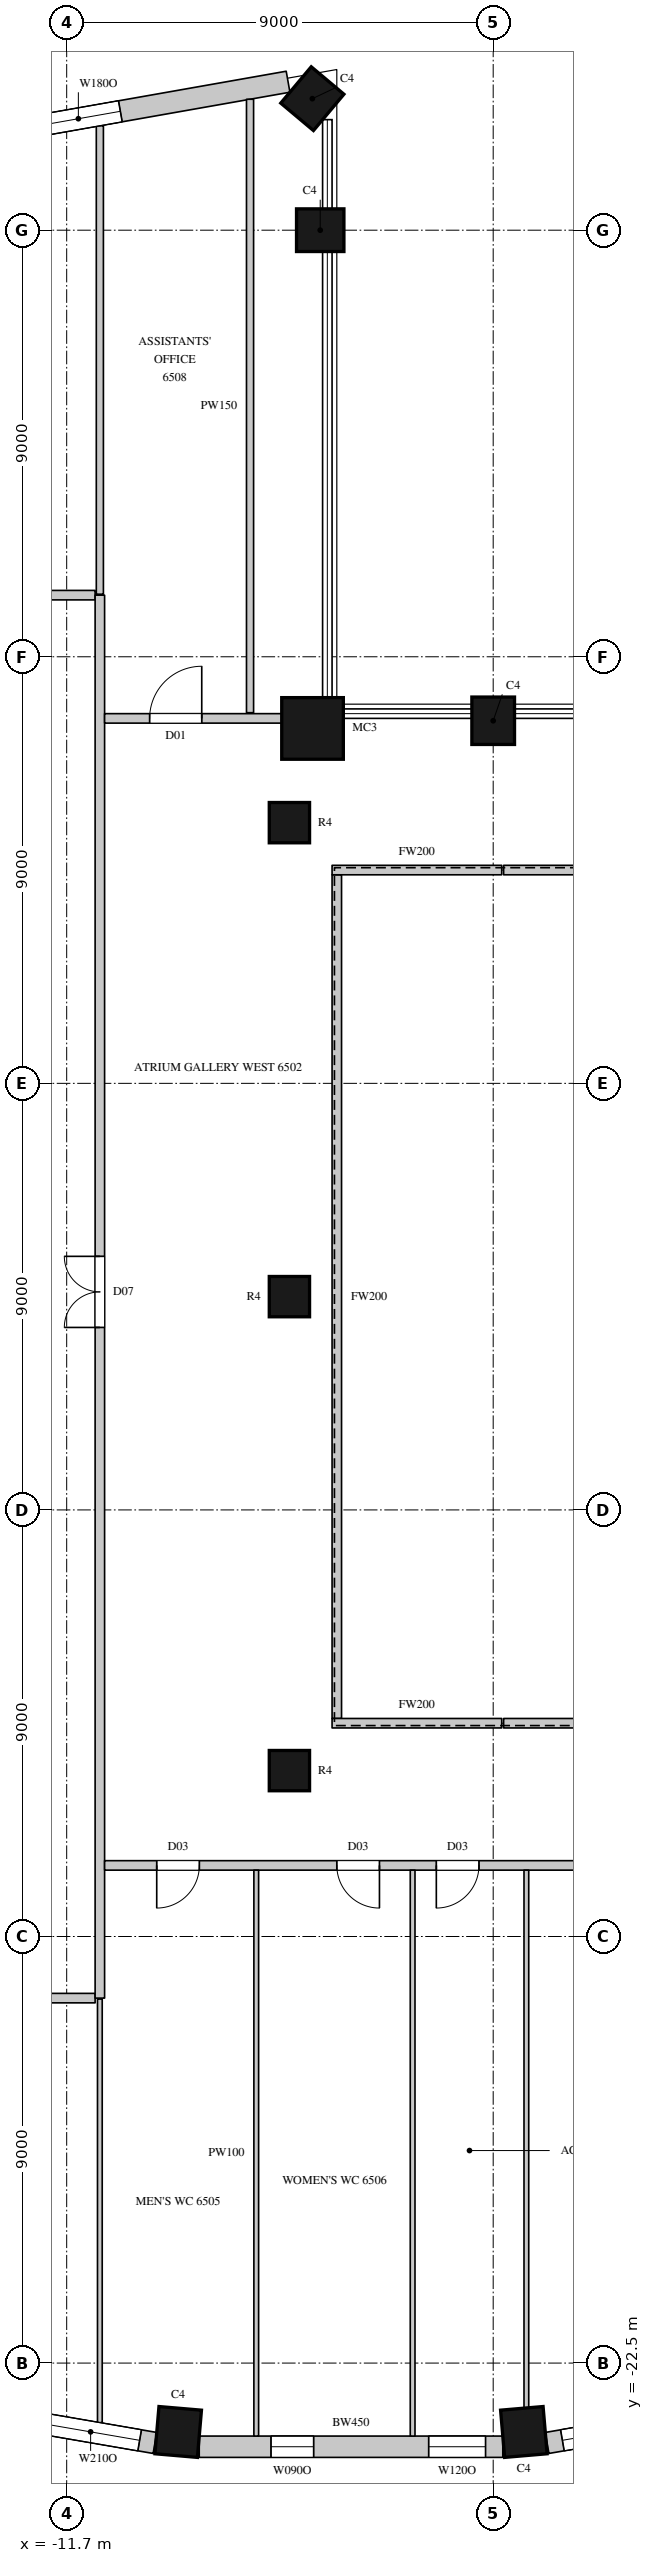
"""IFC4 building model, lengths in metres.
Left out: names, types, materials, properties, quantities, classifications, styles, units other than length and angle.
Written with IfcOpenShell. Run it as: python <this file> out.ifc"""

import sys

from ifc_helpers import new_model, si_unit, direction, frame, frame_2d, origin, origin_2d, place, context, subcontext, project, spatial, rectangle, circle, extrude, element, fill, save


model = new_model("IFC4")
c1 = context("Model", 3, precision=1e-05, world=origin(), true_north=direction((0.0, 1.0)))
c2 = subcontext(c1, "Body", "Model", "MODEL_VIEW")
j1 = project(units=[si_unit("LENGTHUNIT", "METRE"), si_unit("PLANEANGLEUNIT", "RADIAN")], contexts=[c1])
p1 = place(None, origin())
s1 = spatial("IfcSite", under=j1, at=p1, CompositionType="ELEMENT")
p2 = place(p1, origin())
s2 = spatial("IfcBuilding", under=s1, at=p2, CompositionType="ELEMENT")
p3 = place(p2, frame((0.0, 0.0, 288.5)))
s3 = spatial("IfcBuildingStorey", under=s2, at=p3, CompositionType="ELEMENT", Elevation=288.5)
p4 = place(p3, frame((-2.7, 12.15, 0.0), z_axis=(0.0, 0.0, 1.0), x_axis=(-1.0, 0.0, 0.0)))
e1 = element("IfcColumn", 1, at=p4, inside=s3, PredefinedType="COLUMN", context=c2, shape_type="SweptSolid", body=[
    extrude(rectangle(XDim=0.9, YDim=1.0, at=origin_2d()), origin(), (0.0, 0.0, 1.0), 4.1),
])
p5 = place(p3, frame((-6.512, 11.988, 0.0), z_axis=(0.0, 0.0, 1.0), x_axis=(1.0, 0.0, 0.0)))
e2 = element("IfcColumn", 2, at=p5, inside=s3, PredefinedType="COLUMN", context=c2, shape_type="SweptSolid", body=[
    extrude(circle(Radius=0.65, at=origin_2d()), origin(), (0.0, 0.0, 1.0), 4.1),
])
for number, where, z_axis, x_axis in (
    (3, (-6.35, 22.5, 0.0), (0.0, 0.0, 1.0), (0.0, 1.0, 0.0)),
    (4, (-6.516, 25.275, 0.0), (0.0, 0.0, 1.0), (-0.766, 0.643, 0.0)),
    (5, (-9.347, -23.954, 0.0), (0.0, 0.0, 1.0), (0.996, -0.085, 0.0)),
    (6, (-2.053, -23.954, 0.0), (0.0, 0.0, 1.0), (0.996, 0.085, 0.0)),
):
    element("IfcColumn", number, at=place(p3, frame(where, z_axis=z_axis, x_axis=x_axis)), inside=s3, PredefinedType="COLUMN", context=c2, shape_type="SweptSolid", body=[
        extrude(rectangle(XDim=0.9, YDim=1.0, at=origin_2d()), origin(), (0.0, 0.0, 1.0), 4.1),
    ])
for number, where, z_axis, x_axis in (
    (7, (-7.0, -10.0, 0.0), (0.0, 0.0, 1.0), (1.0, 0.0, 0.0)),
    (8, (-7.0, 0.0, 0.0), (0.0, 0.0, 1.0), (1.0, 0.0, 0.0)),
    (9, (-7.0, 10.0, 0.0), (0.0, 0.0, 1.0), (1.0, 0.0, 0.0)),
):
    element("IfcColumn", number, at=place(p3, frame(where, z_axis=z_axis, x_axis=x_axis)), inside=s3, PredefinedType="COLUMN", context=c2, shape_type="SweptSolid", body=[
        extrude(circle(Radius=0.425, at=origin_2d()), origin(), (0.0, 0.0, 1.0), 4.1),
    ])
p6 = place(p3, frame((-7.029, 25.632, 0.0), z_axis=(0.0, 0.0, 1.0), x_axis=(-0.984797606634, -0.173705710808, 0.0)))
e10 = element("IfcWall", 10, at=p6, inside=s3, PredefinedType="SOLIDWALL", context=c2, shape_type="SweptSolid", body=[
    extrude(rectangle(XDim=5.772, YDim=0.45, at=frame_2d((2.886, 0.0))), origin(), (0.0, 0.0, 1.0), 3.8),
])
p7 = place(p6, frame((3.593, 0.0, 1.05)))
e11 = element("IfcOpeningElement", 11, at=p7, cuts=e10, PredefinedType="OPENING", context=c2, shape_type="SweptSolid", body=[
    extrude(rectangle(XDim=1.8, YDim=2.4, at=frame_2d((0.9, 1.2))), frame((0.0, 0.235, 0.0), z_axis=(0.0, -1.0, 0.0), x_axis=(1.0, 0.0, 0.0)), (0.0, 0.0, 1.0), 0.47),
])
p8 = place(p3, frame((-16.157, -23.097, 0.0), z_axis=(0.0, 0.0, 1.0), x_axis=(0.985502073964, -0.169663379113, 0.0)))
e12 = element("IfcWall", 12, at=p8, inside=s3, PredefinedType="SOLIDWALL", context=c2, shape_type="SweptSolid", body=[
    extrude(rectangle(XDim=6.412, YDim=0.45, at=frame_2d((3.206, 0.0))), origin(), (0.0, 0.0, 1.0), 3.8),
])
p9 = place(p8, frame((0.327, 0.0, 1.05)))
e13 = element("IfcOpeningElement", 13, at=p9, cuts=e12, PredefinedType="OPENING", context=c2, shape_type="SweptSolid", body=[
    extrude(rectangle(XDim=2.1, YDim=2.4, at=frame_2d((1.05, 1.2))), frame((0.0, 0.235, 0.0), z_axis=(0.0, -1.0, 0.0), x_axis=(1.0, 0.0, 0.0)), (0.0, 0.0, 1.0), 0.47),
])
p10 = place(p8, frame((3.985, 0.0, 1.05)))
e14 = element("IfcOpeningElement", 14, at=p10, cuts=e12, PredefinedType="OPENING", context=c2, shape_type="SweptSolid", body=[
    extrude(rectangle(XDim=2.1, YDim=2.4, at=frame_2d((1.05, 1.2))), frame((0.0, 0.235, 0.0), z_axis=(0.0, -1.0, 0.0), x_axis=(1.0, 0.0, 0.0)), (0.0, 0.0, 1.0), 0.47),
])
p11 = place(p3, frame((-8.903, -24.265, 0.0), z_axis=(0.0, 0.0, 1.0), x_axis=(1.0, 0.0, 0.0)))
e15 = element("IfcWall", 15, at=p11, inside=s3, PredefinedType="SOLIDWALL", context=c2, shape_type="SweptSolid", body=[
    extrude(rectangle(XDim=6.406, YDim=0.45, at=frame_2d((3.203, 0.0))), origin(), (0.0, 0.0, 1.0), 3.8),
])
p12 = place(p11, frame((1.514, 0.0, 1.05)))
e16 = element("IfcOpeningElement", 16, at=p12, cuts=e15, PredefinedType="OPENING", context=c2, shape_type="SweptSolid", body=[
    extrude(rectangle(XDim=0.9, YDim=2.4, at=frame_2d((0.45, 1.2))), frame((0.0, 0.235, 0.0), z_axis=(0.0, -1.0, 0.0), x_axis=(1.0, 0.0, 0.0)), (0.0, 0.0, 1.0), 0.47),
])
p13 = place(p11, frame((4.841, 0.0, 1.05)))
e17 = element("IfcOpeningElement", 17, at=p13, cuts=e15, PredefinedType="OPENING", context=c2, shape_type="SweptSolid", body=[
    extrude(rectangle(XDim=1.2, YDim=2.4, at=frame_2d((0.6, 1.2))), frame((0.0, 0.235, 0.0), z_axis=(0.0, -1.0, 0.0), x_axis=(1.0, 0.0, 0.0)), (0.0, 0.0, 1.0), 0.47),
])
p14 = place(p3, frame((-1.562, -24.185, 0.0), z_axis=(0.0, 0.0, 1.0), x_axis=(0.985502073964, 0.169663379113, 0.0)))
e18 = element("IfcWall", 18, at=p14, inside=s3, PredefinedType="SOLIDWALL", context=c2, shape_type="SweptSolid", body=[
    extrude(rectangle(XDim=6.412, YDim=0.45, at=frame_2d((3.206, 0.0))), origin(), (0.0, 0.0, 1.0), 3.8),
])
p15 = place(p14, frame((0.327, 0.0, 1.05)))
e19 = element("IfcOpeningElement", 19, at=p15, cuts=e18, PredefinedType="OPENING", context=c2, shape_type="SweptSolid", body=[
    extrude(rectangle(XDim=2.1, YDim=2.4, at=frame_2d((1.05, 1.2))), frame((0.0, 0.235, 0.0), z_axis=(0.0, -1.0, 0.0), x_axis=(1.0, 0.0, 0.0)), (0.0, 0.0, 1.0), 0.47),
])
p16 = place(p14, frame((3.985, 0.0, 1.05)))
e20 = element("IfcOpeningElement", 20, at=p16, cuts=e18, PredefinedType="OPENING", context=c2, shape_type="SweptSolid", body=[
    extrude(rectangle(XDim=2.1, YDim=2.4, at=frame_2d((1.05, 1.2))), frame((0.0, 0.235, 0.0), z_axis=(0.0, -1.0, 0.0), x_axis=(1.0, 0.0, 0.0)), (0.0, 0.0, 1.0), 0.47),
])
for number, where, z_axis, x_axis in (
    (21, (-13.97, -14.8, 0.0), (0.0, 0.0, 1.0), (1.0, 0.0, 0.0)),
    (22, (-13.97, 14.8, 0.0), (0.0, 0.0, 1.0), (1.0, 0.0, 0.0)),
):
    element("IfcWall", number, at=place(p3, frame(where, z_axis=z_axis, x_axis=x_axis)), inside=s3, PredefinedType="PARTITIONING", context=c2, shape_type="SweptSolid", body=[
        extrude(rectangle(XDim=2.87, YDim=0.2, at=frame_2d((1.435, 0.0))), origin(), (0.0, 0.0, 1.0), 3.8),
    ])
p17 = place(p3, frame((-11.0, -14.8, 0.0), z_axis=(0.0, 0.0, 1.0), x_axis=(0.0, 1.0, 0.0)))
e23 = element("IfcWall", 23, at=p17, inside=s3, PredefinedType="PARTITIONING", context=c2, shape_type="SweptSolid", body=[
    extrude(rectangle(XDim=29.6, YDim=0.2, at=frame_2d((14.8, 0.0))), origin(), (0.0, 0.0, 1.0), 3.8),
])
p18 = place(p17, frame((14.15, 0.0, 0.0)))
e24 = element("IfcOpeningElement", 24, at=p18, cuts=e23, PredefinedType="OPENING", context=c2, shape_type="SweptSolid", body=[
    extrude(rectangle(XDim=1.5, YDim=2.4, at=frame_2d((0.75, 1.2))), frame((0.0, 0.11, 0.0), z_axis=(0.0, -1.0, 0.0), x_axis=(1.0, 0.0, 0.0)), (0.0, 0.0, 1.0), 0.22),
])
p19 = place(p3, frame((-10.9, -12.0, 0.0), z_axis=(0.0, 0.0, 1.0), x_axis=(1.0, 0.0, 0.0)))
e25 = element("IfcWall", 25, at=p19, inside=s3, PredefinedType="PARTITIONING", context=c2, shape_type="SweptSolid", body=[
    extrude(rectangle(XDim=21.8, YDim=0.2, at=frame_2d((10.9, 0.0))), origin(), (0.0, 0.0, 1.0), 3.8),
])
p20 = place(p19, frame((1.1, 0.0, 0.0)))
e26 = element("IfcOpeningElement", 26, at=p20, cuts=e25, PredefinedType="OPENING", context=c2, shape_type="SweptSolid", body=[
    extrude(rectangle(XDim=0.9, YDim=2.2, at=frame_2d((0.45, 1.1))), frame((0.0, 0.11, 0.0), z_axis=(0.0, -1.0, 0.0), x_axis=(1.0, 0.0, 0.0)), (0.0, 0.0, 1.0), 0.22),
])
p21 = place(p19, frame((4.9, 0.0, 0.0)))
e27 = element("IfcOpeningElement", 27, at=p21, cuts=e25, PredefinedType="OPENING", context=c2, shape_type="SweptSolid", body=[
    extrude(rectangle(XDim=0.9, YDim=2.2, at=frame_2d((0.45, 1.1))), frame((0.0, 0.11, 0.0), z_axis=(0.0, -1.0, 0.0), x_axis=(1.0, 0.0, 0.0)), (0.0, 0.0, 1.0), 0.22),
])
p22 = place(p19, frame((7.0, 0.0, 0.0)))
e28 = element("IfcOpeningElement", 28, at=p22, cuts=e25, PredefinedType="OPENING", context=c2, shape_type="SweptSolid", body=[
    extrude(rectangle(XDim=0.9, YDim=2.2, at=frame_2d((0.45, 1.1))), frame((0.0, 0.11, 0.0), z_axis=(0.0, -1.0, 0.0), x_axis=(1.0, 0.0, 0.0)), (0.0, 0.0, 1.0), 0.22),
])
p23 = place(p19, frame((9.95, 0.0, 0.0)))
e29 = element("IfcOpeningElement", 29, at=p23, cuts=e25, PredefinedType="OPENING", context=c2, shape_type="SweptSolid", body=[
    extrude(rectangle(XDim=1.1, YDim=2.4, at=frame_2d((0.55, 1.2))), frame((0.0, 0.11, 0.0), z_axis=(0.0, -1.0, 0.0), x_axis=(1.0, 0.0, 0.0)), (0.0, 0.0, 1.0), 0.22),
])
p24 = place(p3, frame((-10.9, 12.2, 0.0), z_axis=(0.0, 0.0, 1.0), x_axis=(1.0, 0.0, 0.0)))
e30 = element("IfcWall", 30, at=p24, inside=s3, PredefinedType="PARTITIONING", context=c2, shape_type="SweptSolid", body=[
    extrude(rectangle(XDim=3.756, YDim=0.2, at=frame_2d((1.878, 0.0))), origin(), (0.0, 0.0, 1.0), 3.8),
])
p25 = place(p24, frame((0.95, 0.0, 0.0)))
e31 = element("IfcOpeningElement", 31, at=p25, cuts=e30, PredefinedType="OPENING", context=c2, shape_type="SweptSolid", body=[
    extrude(rectangle(XDim=1.1, YDim=2.4, at=frame_2d((0.55, 1.2))), frame((0.0, 0.11, 0.0), z_axis=(0.0, -1.0, 0.0), x_axis=(1.0, 0.0, 0.0)), (0.0, 0.0, 1.0), 0.22),
])
p26 = place(p3, frame((-6.0, -8.9, 0.0), z_axis=(0.0, 0.0, 1.0), x_axis=(0.0, 1.0, 0.0)))
e32 = element("IfcWall", 32, at=p26, inside=s3, PredefinedType="PARTITIONING", context=c2, shape_type="SweptSolid", body=[
    extrude(rectangle(XDim=17.8, YDim=0.2, at=frame_2d((8.9, 0.0))), origin(), (0.0, 0.0, 1.0), 3.8),
])
for number, where, z_axis, x_axis in (
    (33, (-6.1, -9.0, 0.0), (0.0, 0.0, 1.0), (1.0, 0.0, 0.0)),
    (34, (-6.1, 9.0, 0.0), (0.0, 0.0, 1.0), (1.0, 0.0, 0.0)),
):
    element("IfcWall", number, at=place(p3, frame(where, z_axis=z_axis, x_axis=x_axis)), inside=s3, PredefinedType="PARTITIONING", context=c2, shape_type="SweptSolid", body=[
        extrude(rectangle(XDim=3.58, YDim=0.2, at=frame_2d((1.79, 0.0))), origin(), (0.0, 0.0, 1.0), 3.8),
    ])
for number, where, z_axis, x_axis in (
    (35, (-2.48, -9.0, 0.0), (0.0, 0.0, 1.0), (1.0, 0.0, 0.0)),
    (36, (-2.48, 9.0, 0.0), (0.0, 0.0, 1.0), (1.0, 0.0, 0.0)),
):
    element("IfcWall", number, at=place(p3, frame(where, z_axis=z_axis, x_axis=x_axis)), inside=s3, PredefinedType="PARTITIONING", context=c2, shape_type="SweptSolid", body=[
        extrude(rectangle(XDim=10.58, YDim=0.2, at=frame_2d((5.29, 0.0))), origin(), (0.0, 0.0, 1.0), 3.8),
    ])
p27 = place(p3, frame((-11.0, 14.82, 0.0), z_axis=(0.0, 0.0, 1.0), x_axis=(0.0, 1.0, 0.0)))
e37 = element("IfcWall", 37, at=p27, inside=s3, PredefinedType="PARTITIONING", context=c2, shape_type="SweptSolid", body=[
    extrude(rectangle(XDim=9.883, YDim=0.15, at=frame_2d((4.942, 0.0))), origin(), (0.0, 0.0, 1.0), 3.8),
])
p28 = place(p3, frame((-7.831, 12.32, 0.0), z_axis=(0.0, 0.0, 1.0), x_axis=(0.0, 1.0, 0.0)))
e38 = element("IfcWall", 38, at=p28, inside=s3, PredefinedType="PARTITIONING", context=c2, shape_type="SweptSolid", body=[
    extrude(rectangle(XDim=12.942, YDim=0.15, at=frame_2d((6.471, 0.0))), origin(), (0.0, 0.0, 1.0), 3.8),
])
p29 = place(p3, frame((-11.0, -23.757, 0.0), z_axis=(0.0, 0.0, 1.0), x_axis=(0.0, 1.0, 0.0)))
e39 = element("IfcWall", 39, at=p29, inside=s3, PredefinedType="PARTITIONING", context=c2, shape_type="SweptSolid", body=[
    extrude(rectangle(XDim=8.937, YDim=0.1, at=frame_2d((4.468, 0.0))), origin(), (0.0, 0.0, 1.0), 3.8),
])
for number, where, z_axis, x_axis in (
    (40, (-7.7, -24.04, 0.0), (0.0, 0.0, 1.0), (0.0, 1.0, 0.0)),
    (41, (-4.4, -24.04, 0.0), (0.0, 0.0, 1.0), (0.0, 1.0, 0.0)),
):
    element("IfcWall", number, at=place(p3, frame(where, z_axis=z_axis, x_axis=x_axis)), inside=s3, PredefinedType="PARTITIONING", context=c2, shape_type="SweptSolid", body=[
        extrude(rectangle(XDim=11.94, YDim=0.1, at=frame_2d((5.97, 0.0))), origin(), (0.0, 0.0, 1.0), 3.8),
    ])
p30 = place(p3, frame((-2.0, -23.447, 0.0), z_axis=(0.0, 0.0, 1.0), x_axis=(0.0, 1.0, 0.0)))
e42 = element("IfcWall", 42, at=p30, inside=s3, PredefinedType="PARTITIONING", context=c2, shape_type="SweptSolid", body=[
    extrude(rectangle(XDim=11.347, YDim=0.1, at=frame_2d((5.674, 0.0))), origin(), (0.0, 0.0, 1.0), 3.8),
])
p31 = place(p7, origin())
e43 = element("IfcWindow", 43, at=p31, inside=s3, PartitioningType="SINGLE_PANEL", PredefinedType="WINDOW", context=c2, shape_type="SweptSolid", body=[
    extrude(rectangle(XDim=1.8, YDim=2.4, at=frame_2d((0.9, 1.2))), frame((0.0, 0.135, 0.0), z_axis=(0.0, -1.0, 0.0), x_axis=(1.0, 0.0, 0.0)), (0.0, 0.0, 1.0), 0.06),
])
fill(e11, e43)
p32 = place(p10, origin())
e44 = element("IfcWindow", 44, at=p32, inside=s3, PartitioningType="SINGLE_PANEL", PredefinedType="WINDOW", context=c2, shape_type="SweptSolid", body=[
    extrude(rectangle(XDim=2.1, YDim=2.4, at=frame_2d((1.05, 1.2))), frame((0.0, 0.135, 0.0), z_axis=(0.0, -1.0, 0.0), x_axis=(1.0, 0.0, 0.0)), (0.0, 0.0, 1.0), 0.06),
])
fill(e14, e44)
p33 = place(p15, origin())
e45 = element("IfcWindow", 45, at=p33, inside=s3, PartitioningType="SINGLE_PANEL", PredefinedType="WINDOW", context=c2, shape_type="SweptSolid", body=[
    extrude(rectangle(XDim=2.1, YDim=2.4, at=frame_2d((1.05, 1.2))), frame((0.0, 0.135, 0.0), z_axis=(0.0, -1.0, 0.0), x_axis=(1.0, 0.0, 0.0)), (0.0, 0.0, 1.0), 0.06),
])
fill(e19, e45)
p34 = place(p18, origin())
e46 = element("IfcDoor", 46, at=p34, inside=s3, OperationType="DOUBLE_DOOR_SINGLE_SWING", PredefinedType="DOOR", context=c2, shape_type="SweptSolid", body=[
    extrude(rectangle(XDim=1.5, YDim=2.4, at=frame_2d((0.75, 1.2))), frame((0.0, 0.025, 0.0), z_axis=(0.0, -1.0, 0.0), x_axis=(1.0, 0.0, 0.0)), (0.0, 0.0, 1.0), 0.05),
])
fill(e24, e46)
p35 = place(p20, origin())
e47 = element("IfcDoor", 47, at=p35, inside=s3, OperationType="SINGLE_SWING_RIGHT", PredefinedType="DOOR", context=c2, shape_type="SweptSolid", body=[
    extrude(rectangle(XDim=0.9, YDim=2.2, at=frame_2d((0.45, 1.1))), frame((0.0, 0.025, 0.0), z_axis=(0.0, -1.0, 0.0), x_axis=(1.0, 0.0, 0.0)), (0.0, 0.0, 1.0), 0.05),
])
fill(e26, e47)
p36 = place(p21, origin())
e48 = element("IfcDoor", 48, at=p36, inside=s3, OperationType="SINGLE_SWING_LEFT", PredefinedType="DOOR", context=c2, shape_type="SweptSolid", body=[
    extrude(rectangle(XDim=0.9, YDim=2.2, at=frame_2d((0.45, 1.1))), frame((0.0, 0.025, 0.0), z_axis=(0.0, -1.0, 0.0), x_axis=(1.0, 0.0, 0.0)), (0.0, 0.0, 1.0), 0.05),
])
fill(e27, e48)
p37 = place(p22, origin())
e49 = element("IfcDoor", 49, at=p37, inside=s3, OperationType="SINGLE_SWING_RIGHT", PredefinedType="DOOR", context=c2, shape_type="SweptSolid", body=[
    extrude(rectangle(XDim=0.9, YDim=2.2, at=frame_2d((0.45, 1.1))), frame((0.0, 0.025, 0.0), z_axis=(0.0, -1.0, 0.0), x_axis=(1.0, 0.0, 0.0)), (0.0, 0.0, 1.0), 0.05),
])
fill(e28, e49)
p38 = place(p25, origin())
e50 = element("IfcDoor", 50, at=p38, inside=s3, OperationType="SINGLE_SWING_RIGHT", PredefinedType="DOOR", context=c2, shape_type="SweptSolid", body=[
    extrude(rectangle(XDim=1.1, YDim=2.4, at=frame_2d((0.55, 1.2))), frame((0.0, 0.025, 0.0), z_axis=(0.0, -1.0, 0.0), x_axis=(1.0, 0.0, 0.0)), (0.0, 0.0, 1.0), 0.05),
])
fill(e31, e50)
p39 = place(p12, origin())
e51 = element("IfcWindow", 51, at=p39, inside=s3, PartitioningType="SINGLE_PANEL", PredefinedType="WINDOW", context=c2, shape_type="SweptSolid", body=[
    extrude(rectangle(XDim=0.9, YDim=2.4, at=frame_2d((0.45, 1.2))), frame((0.0, 0.135, 0.0), z_axis=(0.0, -1.0, 0.0), x_axis=(1.0, 0.0, 0.0)), (0.0, 0.0, 1.0), 0.06),
])
fill(e16, e51)
p40 = place(p13, origin())
e52 = element("IfcWindow", 52, at=p40, inside=s3, PartitioningType="SINGLE_PANEL", PredefinedType="WINDOW", context=c2, shape_type="SweptSolid", body=[
    extrude(rectangle(XDim=1.2, YDim=2.4, at=frame_2d((0.6, 1.2))), frame((0.0, 0.135, 0.0), z_axis=(0.0, -1.0, 0.0), x_axis=(1.0, 0.0, 0.0)), (0.0, 0.0, 1.0), 0.06),
])
fill(e17, e52)
save(model, sys.argv[1])
